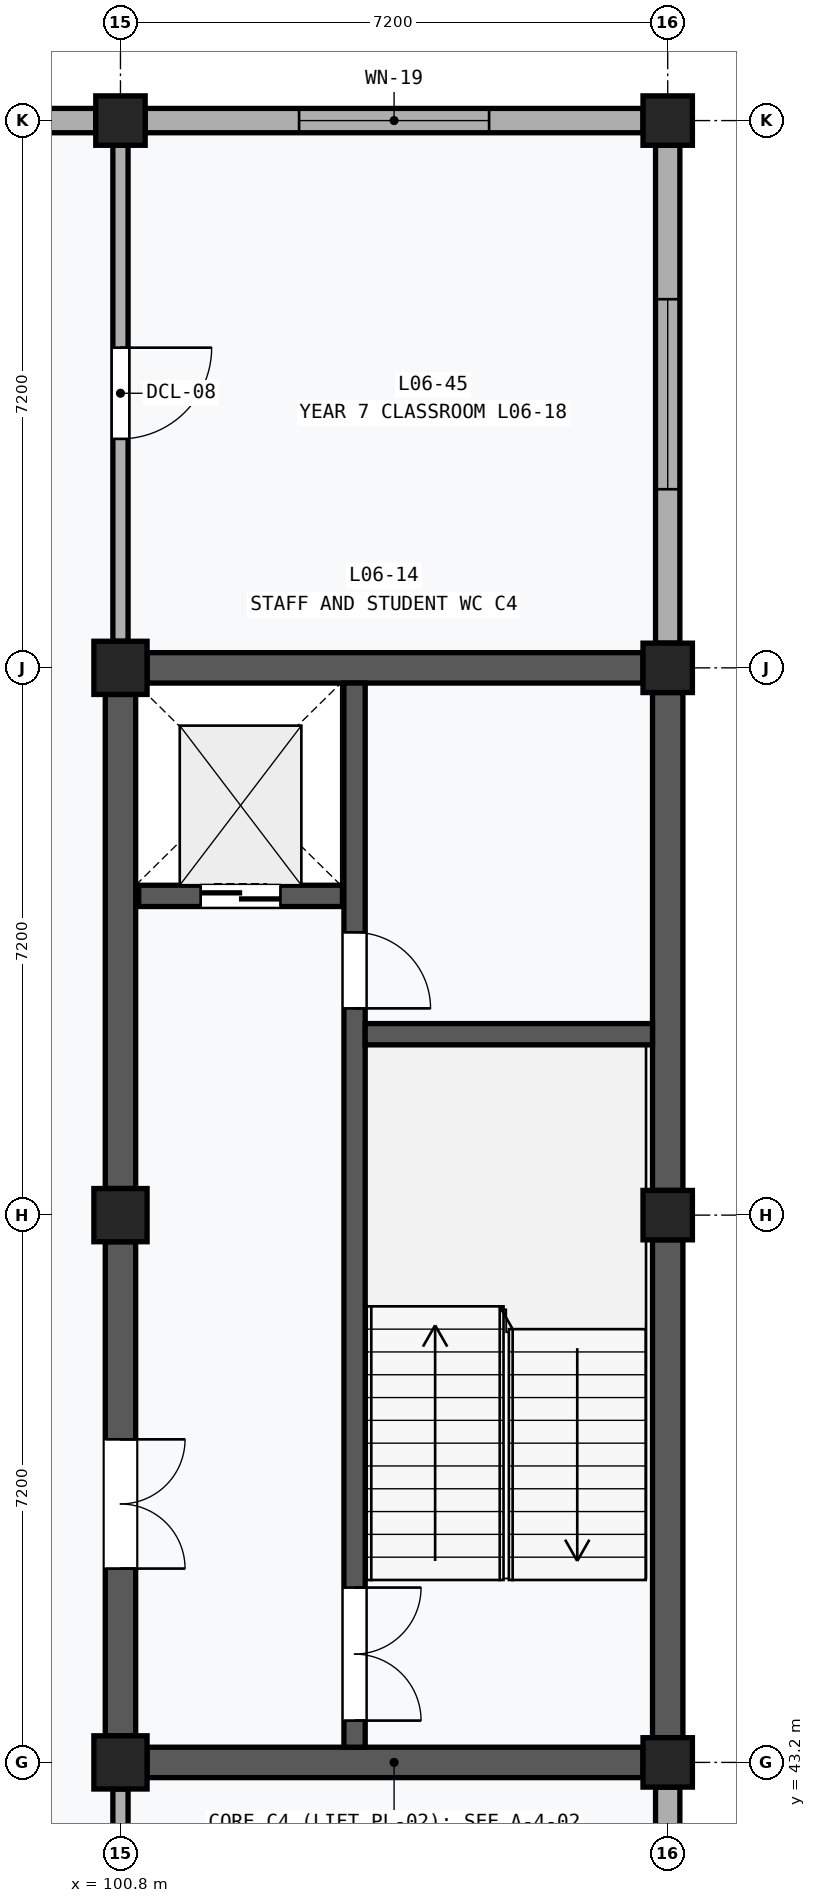
"""IFC4 building model, lengths in metres.
Left out: names, types, materials, properties, quantities, classifications, styles, units other than length and angle.
Written with IfcOpenShell. Run it as: python <this file> out.ifc"""

import sys

from ifc_helpers import new_model, si_unit, direction, frame, frame_2d, origin, origin_2d, place, context, subcontext, project, spatial, rectangle, extrude, element, fill, save


model = new_model("IFC4")
c1 = context("Model", 3, precision=1e-05, world=origin(), true_north=direction((0.0, 1.0)))
c2 = subcontext(c1, "Body", "Model", "MODEL_VIEW")
j1 = project(units=[si_unit("LENGTHUNIT", "METRE"), si_unit("PLANEANGLEUNIT", "RADIAN")], contexts=[c1])
p1 = place(None, origin())
s1 = spatial("IfcSite", under=j1, at=p1, CompositionType="ELEMENT")
p2 = place(p1, origin())
s2 = spatial("IfcBuilding", under=s1, at=p2, CompositionType="ELEMENT")
p3 = place(p2, frame((0.0, 0.0, 26.6)))
s3 = spatial("IfcBuildingStorey", under=s2, at=p3, CompositionType="ELEMENT", Elevation=26.6)
for number, where, z_axis, x_axis in (
    (1, (100.8, 43.2, 0.0), (0.0, 0.0, 1.0), (1.0, 0.0, 0.0)),
    (2, (100.8, 50.4, 0.0), (0.0, 0.0, 1.0), (1.0, 0.0, 0.0)),
    (3, (100.8, 57.6, 0.0), (0.0, 0.0, 1.0), (1.0, 0.0, 0.0)),
):
    element("IfcColumn", number, at=place(p3, frame(where, z_axis=z_axis, x_axis=x_axis)), inside=s3, PredefinedType="COLUMN", context=c2, shape_type="SweptSolid", body=[
        extrude(rectangle(XDim=0.7, YDim=0.7, at=origin_2d()), origin(), (0.0, 0.0, 1.0), 4.0),
    ])
for number, where, z_axis, x_axis in (
    (4, (100.8, 64.8, 0.0), (0.0, 0.0, 1.0), (1.0, 0.0, 0.0)),
    (5, (108.0, 43.2, 0.0), (0.0, 0.0, 1.0), (1.0, 0.0, 0.0)),
    (6, (108.0, 50.4, 0.0), (0.0, 0.0, 1.0), (1.0, 0.0, 0.0)),
    (7, (108.0, 57.6, 0.0), (0.0, 0.0, 1.0), (1.0, 0.0, 0.0)),
    (8, (108.0, 64.8, 0.0), (0.0, 0.0, 1.0), (1.0, 0.0, 0.0)),
):
    element("IfcColumn", number, at=place(p3, frame(where, z_axis=z_axis, x_axis=x_axis)), inside=s3, PredefinedType="COLUMN", context=c2, shape_type="SweptSolid", body=[
        extrude(rectangle(XDim=0.65, YDim=0.65, at=origin_2d()), origin(), (0.0, 0.0, 1.0), 4.0),
    ])
p4 = place(p3, frame((93.925, 64.8, 0.0), z_axis=(0.0, 0.0, 1.0), x_axis=(1.0, 0.0, 0.0)))
e9 = element("IfcWall", 9, at=p4, inside=s3, PredefinedType="SOLIDWALL", context=c2, shape_type="SweptSolid", body=[
    extrude(rectangle(XDim=6.55, YDim=0.32, at=frame_2d((3.275, 0.0))), origin(), (0.0, 0.0, 1.0), 3.1),
])
p5 = place(p4, frame((2.175, 0.0, 1.1)))
e10 = element("IfcOpeningElement", 10, at=p5, cuts=e9, PredefinedType="OPENING", context=c2, shape_type="SweptSolid", body=[
    extrude(rectangle(XDim=2.2, YDim=1.5, at=frame_2d((1.1, 0.75))), frame((0.0, 0.172, 0.0), z_axis=(0.0, -1.0, 0.0), x_axis=(1.0, 0.0, 0.0)), (0.0, 0.0, 1.0), 0.344),
])
p6 = place(p3, frame((108.0, 36.375, 0.0), z_axis=(0.0, 0.0, 1.0), x_axis=(0.0, 1.0, 0.0)))
e11 = element("IfcWall", 11, at=p6, inside=s3, PredefinedType="SOLIDWALL", context=c2, shape_type="SweptSolid", body=[
    extrude(rectangle(XDim=6.5, YDim=0.32, at=frame_2d((3.25, 0.0))), origin(), (0.0, 0.0, 1.0), 3.1),
])
p7 = place(p6, frame((2.45, 0.0, 1.1)))
e12 = element("IfcOpeningElement", 12, at=p7, cuts=e11, PredefinedType="OPENING", context=c2, shape_type="SweptSolid", body=[
    extrude(rectangle(XDim=1.6, YDim=1.5, at=frame_2d((0.8, 0.75))), frame((0.0, 0.172, 0.0), z_axis=(0.0, -1.0, 0.0), x_axis=(1.0, 0.0, 0.0)), (0.0, 0.0, 1.0), 0.344),
])
p8 = place(p3, frame((101.125, 64.8, 0.0), z_axis=(0.0, 0.0, 1.0), x_axis=(1.0, 0.0, 0.0)))
e13 = element("IfcWall", 13, at=p8, inside=s3, PredefinedType="SOLIDWALL", context=c2, shape_type="SweptSolid", body=[
    extrude(rectangle(XDim=6.55, YDim=0.32, at=frame_2d((3.275, 0.0))), origin(), (0.0, 0.0, 1.0), 3.1),
])
p9 = place(p8, frame((2.025, 0.0, 1.1)))
e14 = element("IfcOpeningElement", 14, at=p9, cuts=e13, PredefinedType="OPENING", context=c2, shape_type="SweptSolid", body=[
    extrude(rectangle(XDim=2.5, YDim=1.5, at=frame_2d((1.25, 0.75))), frame((0.0, 0.172, 0.0), z_axis=(0.0, -1.0, 0.0), x_axis=(1.0, 0.0, 0.0)), (0.0, 0.0, 1.0), 0.344),
])
p10 = place(p3, frame((108.0, 57.925, 0.0), z_axis=(0.0, 0.0, 1.0), x_axis=(0.0, 1.0, 0.0)))
e15 = element("IfcWall", 15, at=p10, inside=s3, PredefinedType="SOLIDWALL", context=c2, shape_type="SweptSolid", body=[
    extrude(rectangle(XDim=6.55, YDim=0.32, at=frame_2d((3.275, 0.0))), origin(), (0.0, 0.0, 1.0), 3.1),
])
p11 = place(p10, frame((2.025, 0.0, 1.1)))
e16 = element("IfcOpeningElement", 16, at=p11, cuts=e15, PredefinedType="OPENING", context=c2, shape_type="SweptSolid", body=[
    extrude(rectangle(XDim=2.5, YDim=1.5, at=frame_2d((1.25, 0.75))), frame((0.0, 0.172, 0.0), z_axis=(0.0, -1.0, 0.0), x_axis=(1.0, 0.0, 0.0)), (0.0, 0.0, 1.0), 0.344),
])
p12 = place(p3, frame((100.8, 43.55, 0.0), z_axis=(0.0, 0.0, 1.0), x_axis=(0.0, 1.0, 0.0)))
e17 = element("IfcWall", 17, at=p12, inside=s3, PredefinedType="SHEAR", context=c2, shape_type="SweptSolid", body=[
    extrude(rectangle(XDim=6.5, YDim=0.4, at=frame_2d((3.25, 0.0))), origin(), (0.0, 0.0, 1.0), 2.96),
])
p13 = place(p12, frame((2.2, 0.0, 0.0)))
e18 = element("IfcOpeningElement", 18, at=p13, cuts=e17, PredefinedType="OPENING", context=c2, shape_type="SweptSolid", body=[
    extrude(rectangle(XDim=1.7, YDim=2.25, at=frame_2d((0.85, 1.125))), frame((0.0, 0.212, 0.0), z_axis=(0.0, -1.0, 0.0), x_axis=(1.0, 0.0, 0.0)), (0.0, 0.0, 1.0), 0.424),
])
p14 = place(p3, frame((100.8, 50.75, 0.0), z_axis=(0.0, 0.0, 1.0), x_axis=(0.0, 1.0, 0.0)))
e19 = element("IfcWall", 19, at=p14, inside=s3, PredefinedType="SHEAR", context=c2, shape_type="SweptSolid", body=[
    extrude(rectangle(XDim=6.5, YDim=0.4, at=frame_2d((3.25, 0.0))), origin(), (0.0, 0.0, 1.0), 2.96),
])
p15 = place(p3, frame((108.0, 43.525, 0.0), z_axis=(0.0, 0.0, 1.0), x_axis=(0.0, 1.0, 0.0)))
e20 = element("IfcWall", 20, at=p15, inside=s3, PredefinedType="SHEAR", context=c2, shape_type="SweptSolid", body=[
    extrude(rectangle(XDim=6.55, YDim=0.4, at=frame_2d((3.275, 0.0))), origin(), (0.0, 0.0, 1.0), 3.1),
])
p16 = place(p3, frame((108.0, 50.725, 0.0), z_axis=(0.0, 0.0, 1.0), x_axis=(0.0, 1.0, 0.0)))
e21 = element("IfcWall", 21, at=p16, inside=s3, PredefinedType="SHEAR", context=c2, shape_type="SweptSolid", body=[
    extrude(rectangle(XDim=6.55, YDim=0.4, at=frame_2d((3.275, 0.0))), origin(), (0.0, 0.0, 1.0), 3.1),
])
p17 = place(p3, frame((101.15, 43.2, 0.0), z_axis=(0.0, 0.0, 1.0), x_axis=(1.0, 0.0, 0.0)))
e22 = element("IfcWall", 22, at=p17, inside=s3, PredefinedType="SHEAR", context=c2, shape_type="SweptSolid", body=[
    extrude(rectangle(XDim=6.525, YDim=0.4, at=frame_2d((3.263, 0.0))), origin(), (0.0, 0.0, 1.0), 3.03),
])
p18 = place(p3, frame((101.15, 57.6, 0.0), z_axis=(0.0, 0.0, 1.0), x_axis=(1.0, 0.0, 0.0)))
e23 = element("IfcWall", 23, at=p18, inside=s3, PredefinedType="SHEAR", context=c2, shape_type="SweptSolid", body=[
    extrude(rectangle(XDim=6.525, YDim=0.4, at=frame_2d((3.263, 0.0))), origin(), (0.0, 0.0, 1.0), 2.96),
])
p19 = place(p3, frame((103.88, 43.4, 0.0), z_axis=(0.0, 0.0, 1.0), x_axis=(0.0, 1.0, 0.0)))
e24 = element("IfcWall", 24, at=p19, inside=s3, PredefinedType="SHEAR", context=c2, shape_type="SweptSolid", body=[
    extrude(rectangle(XDim=14.0, YDim=0.28, at=frame_2d((7.0, 0.0))), origin(), (0.0, 0.0, 1.0), 3.73),
])
p20 = place(p19, frame((0.35, 0.0, 0.0)))
e25 = element("IfcOpeningElement", 25, at=p20, cuts=e24, PredefinedType="OPENING", context=c2, shape_type="SweptSolid", body=[
    extrude(rectangle(XDim=1.75, YDim=2.15, at=frame_2d((0.875, 1.075))), frame((0.0, 0.152, 0.0), z_axis=(0.0, -1.0, 0.0), x_axis=(1.0, 0.0, 0.0)), (0.0, 0.0, 1.0), 0.304),
])
p21 = place(p19, frame((9.72, 0.0, 0.0)))
e26 = element("IfcOpeningElement", 26, at=p21, cuts=e24, PredefinedType="OPENING", context=c2, shape_type="SweptSolid", body=[
    extrude(rectangle(XDim=1.0, YDim=2.15, at=frame_2d((0.5, 1.075))), frame((0.0, 0.152, 0.0), z_axis=(0.0, -1.0, 0.0), x_axis=(1.0, 0.0, 0.0)), (0.0, 0.0, 1.0), 0.304),
])
p22 = place(p3, frame((104.02, 52.78, 0.0), z_axis=(0.0, 0.0, 1.0), x_axis=(1.0, 0.0, 0.0)))
e27 = element("IfcWall", 27, at=p22, inside=s3, PredefinedType="SHEAR", context=c2, shape_type="SweptSolid", body=[
    extrude(rectangle(XDim=3.78, YDim=0.28, at=frame_2d((1.89, 0.0))), origin(), (0.0, 0.0, 1.0), 3.73),
])
p23 = place(p3, frame((101.04, 54.6, 0.0), z_axis=(0.0, 0.0, 1.0), x_axis=(1.0, 0.0, 0.0)))
e28 = element("IfcWall", 28, at=p23, inside=s3, PredefinedType="SHEAR", context=c2, shape_type="SweptSolid", body=[
    extrude(rectangle(XDim=2.68, YDim=0.28, at=frame_2d((1.34, 0.0))), origin(), (0.0, 0.0, 1.0), 3.73),
])
p24 = place(p23, frame((0.815, 0.0, 0.0)))
e29 = element("IfcOpeningElement", 29, at=p24, cuts=e28, PredefinedType="OPENING", context=c2, shape_type="SweptSolid", body=[
    extrude(rectangle(XDim=1.05, YDim=2.2, at=frame_2d((0.525, 1.1))), frame((0.0, 0.152, 0.0), z_axis=(0.0, -1.0, 0.0), x_axis=(1.0, 0.0, 0.0)), (0.0, 0.0, 1.0), 0.304),
])
p25 = place(p3, frame((100.8, 36.35, 0.0), z_axis=(0.0, 0.0, 1.0), x_axis=(0.0, 1.0, 0.0)))
e30 = element("IfcWall", 30, at=p25, inside=s3, PredefinedType="PARTITIONING", context=c2, shape_type="SweptSolid", body=[
    extrude(rectangle(XDim=6.5, YDim=0.2, at=frame_2d((3.25, 0.0))), origin(), (0.0, 0.0, 1.0), 2.96),
])
p26 = place(p3, frame((100.8, 57.95, 0.0), z_axis=(0.0, 0.0, 1.0), x_axis=(0.0, 1.0, 0.0)))
e31 = element("IfcWall", 31, at=p26, inside=s3, PredefinedType="PARTITIONING", context=c2, shape_type="SweptSolid", body=[
    extrude(rectangle(XDim=6.525, YDim=0.2, at=frame_2d((3.263, 0.0))), origin(), (0.0, 0.0, 1.0), 2.96),
])
p27 = place(p26, frame((2.663, 0.0, 0.0)))
e32 = element("IfcOpeningElement", 32, at=p27, cuts=e31, PredefinedType="OPENING", context=c2, shape_type="SweptSolid", body=[
    extrude(rectangle(XDim=1.2, YDim=2.24, at=frame_2d((0.6, 1.12))), frame((0.0, 0.112, 0.0), z_axis=(0.0, -1.0, 0.0), x_axis=(1.0, 0.0, 0.0)), (0.0, 0.0, 1.0), 0.224),
])
p28 = place(p9, origin())
e33 = element("IfcWindow", 33, at=p28, inside=s3, PartitioningType="SINGLE_PANEL", PredefinedType="WINDOW", context=c2, shape_type="SweptSolid", body=[
    extrude(rectangle(XDim=2.5, YDim=1.5, at=frame_2d((1.25, 0.75))), frame((0.0, 0.03, 0.0), z_axis=(0.0, -1.0, 0.0), x_axis=(1.0, 0.0, 0.0)), (0.0, 0.0, 1.0), 0.06),
])
fill(e14, e33)
p29 = place(p11, origin())
e34 = element("IfcWindow", 34, at=p29, inside=s3, PartitioningType="SINGLE_PANEL", PredefinedType="WINDOW", context=c2, shape_type="SweptSolid", body=[
    extrude(rectangle(XDim=2.5, YDim=1.5, at=frame_2d((1.25, 0.75))), frame((0.0, 0.03, 0.0), z_axis=(0.0, -1.0, 0.0), x_axis=(1.0, 0.0, 0.0)), (0.0, 0.0, 1.0), 0.06),
])
fill(e16, e34)
p30 = place(p13, frame((1.7, 0.0, 0.0), z_axis=(0.0, 0.0, 1.0), x_axis=(-1.0, 0.0, 0.0)))
e35 = element("IfcDoor", 35, at=p30, inside=s3, OperationType="DOUBLE_DOOR_SINGLE_SWING", PredefinedType="DOOR", context=c2, shape_type="SweptSolid", body=[
    extrude(rectangle(XDim=1.7, YDim=2.25, at=frame_2d((0.85, 1.125))), frame((0.0, 0.025, 0.0), z_axis=(0.0, -1.0, 0.0), x_axis=(1.0, 0.0, 0.0)), (0.0, 0.0, 1.0), 0.05),
])
fill(e18, e35)
p31 = place(p20, frame((1.75, 0.0, 0.0), z_axis=(0.0, 0.0, 1.0), x_axis=(-1.0, 0.0, 0.0)))
e36 = element("IfcDoor", 36, at=p31, inside=s3, OperationType="DOUBLE_DOOR_SINGLE_SWING", PredefinedType="DOOR", context=c2, shape_type="SweptSolid", body=[
    extrude(rectangle(XDim=1.75, YDim=2.15, at=frame_2d((0.875, 1.075))), frame((0.0, 0.025, 0.0), z_axis=(0.0, -1.0, 0.0), x_axis=(1.0, 0.0, 0.0)), (0.0, 0.0, 1.0), 0.05),
])
fill(e25, e36)
p32 = place(p21, frame((1.0, 0.0, 0.0), z_axis=(0.0, 0.0, 1.0), x_axis=(-1.0, 0.0, 0.0)))
e37 = element("IfcDoor", 37, at=p32, inside=s3, OperationType="SINGLE_SWING_RIGHT", PredefinedType="DOOR", context=c2, shape_type="SweptSolid", body=[
    extrude(rectangle(XDim=1.0, YDim=2.15, at=frame_2d((0.5, 1.075))), frame((0.0, 0.025, 0.0), z_axis=(0.0, -1.0, 0.0), x_axis=(1.0, 0.0, 0.0)), (0.0, 0.0, 1.0), 0.05),
])
fill(e26, e37)
p33 = place(p24, frame((1.05, 0.0, 0.0), z_axis=(0.0, 0.0, 1.0), x_axis=(-1.0, 0.0, 0.0)))
e38 = element("IfcDoor", 38, at=p33, inside=s3, OperationType="DOUBLE_DOOR_SLIDING", PredefinedType="DOOR", context=c2, shape_type="SweptSolid", body=[
    extrude(rectangle(XDim=1.05, YDim=2.2, at=frame_2d((0.525, 1.1))), frame((0.0, 0.025, 0.0), z_axis=(0.0, -1.0, 0.0), x_axis=(1.0, 0.0, 0.0)), (0.0, 0.0, 1.0), 0.05),
])
fill(e29, e38)
p34 = place(p27, frame((1.2, 0.0, 0.0), z_axis=(0.0, 0.0, 1.0), x_axis=(-1.0, 0.0, 0.0)))
e39 = element("IfcDoor", 39, at=p34, inside=s3, OperationType="SINGLE_SWING_LEFT", PredefinedType="DOOR", context=c2, shape_type="SweptSolid", body=[
    extrude(rectangle(XDim=1.2, YDim=2.24, at=frame_2d((0.6, 1.12))), frame((0.0, 0.025, 0.0), z_axis=(0.0, -1.0, 0.0), x_axis=(1.0, 0.0, 0.0)), (0.0, 0.0, 1.0), 0.05),
])
fill(e32, e39)
save(model, sys.argv[1])
